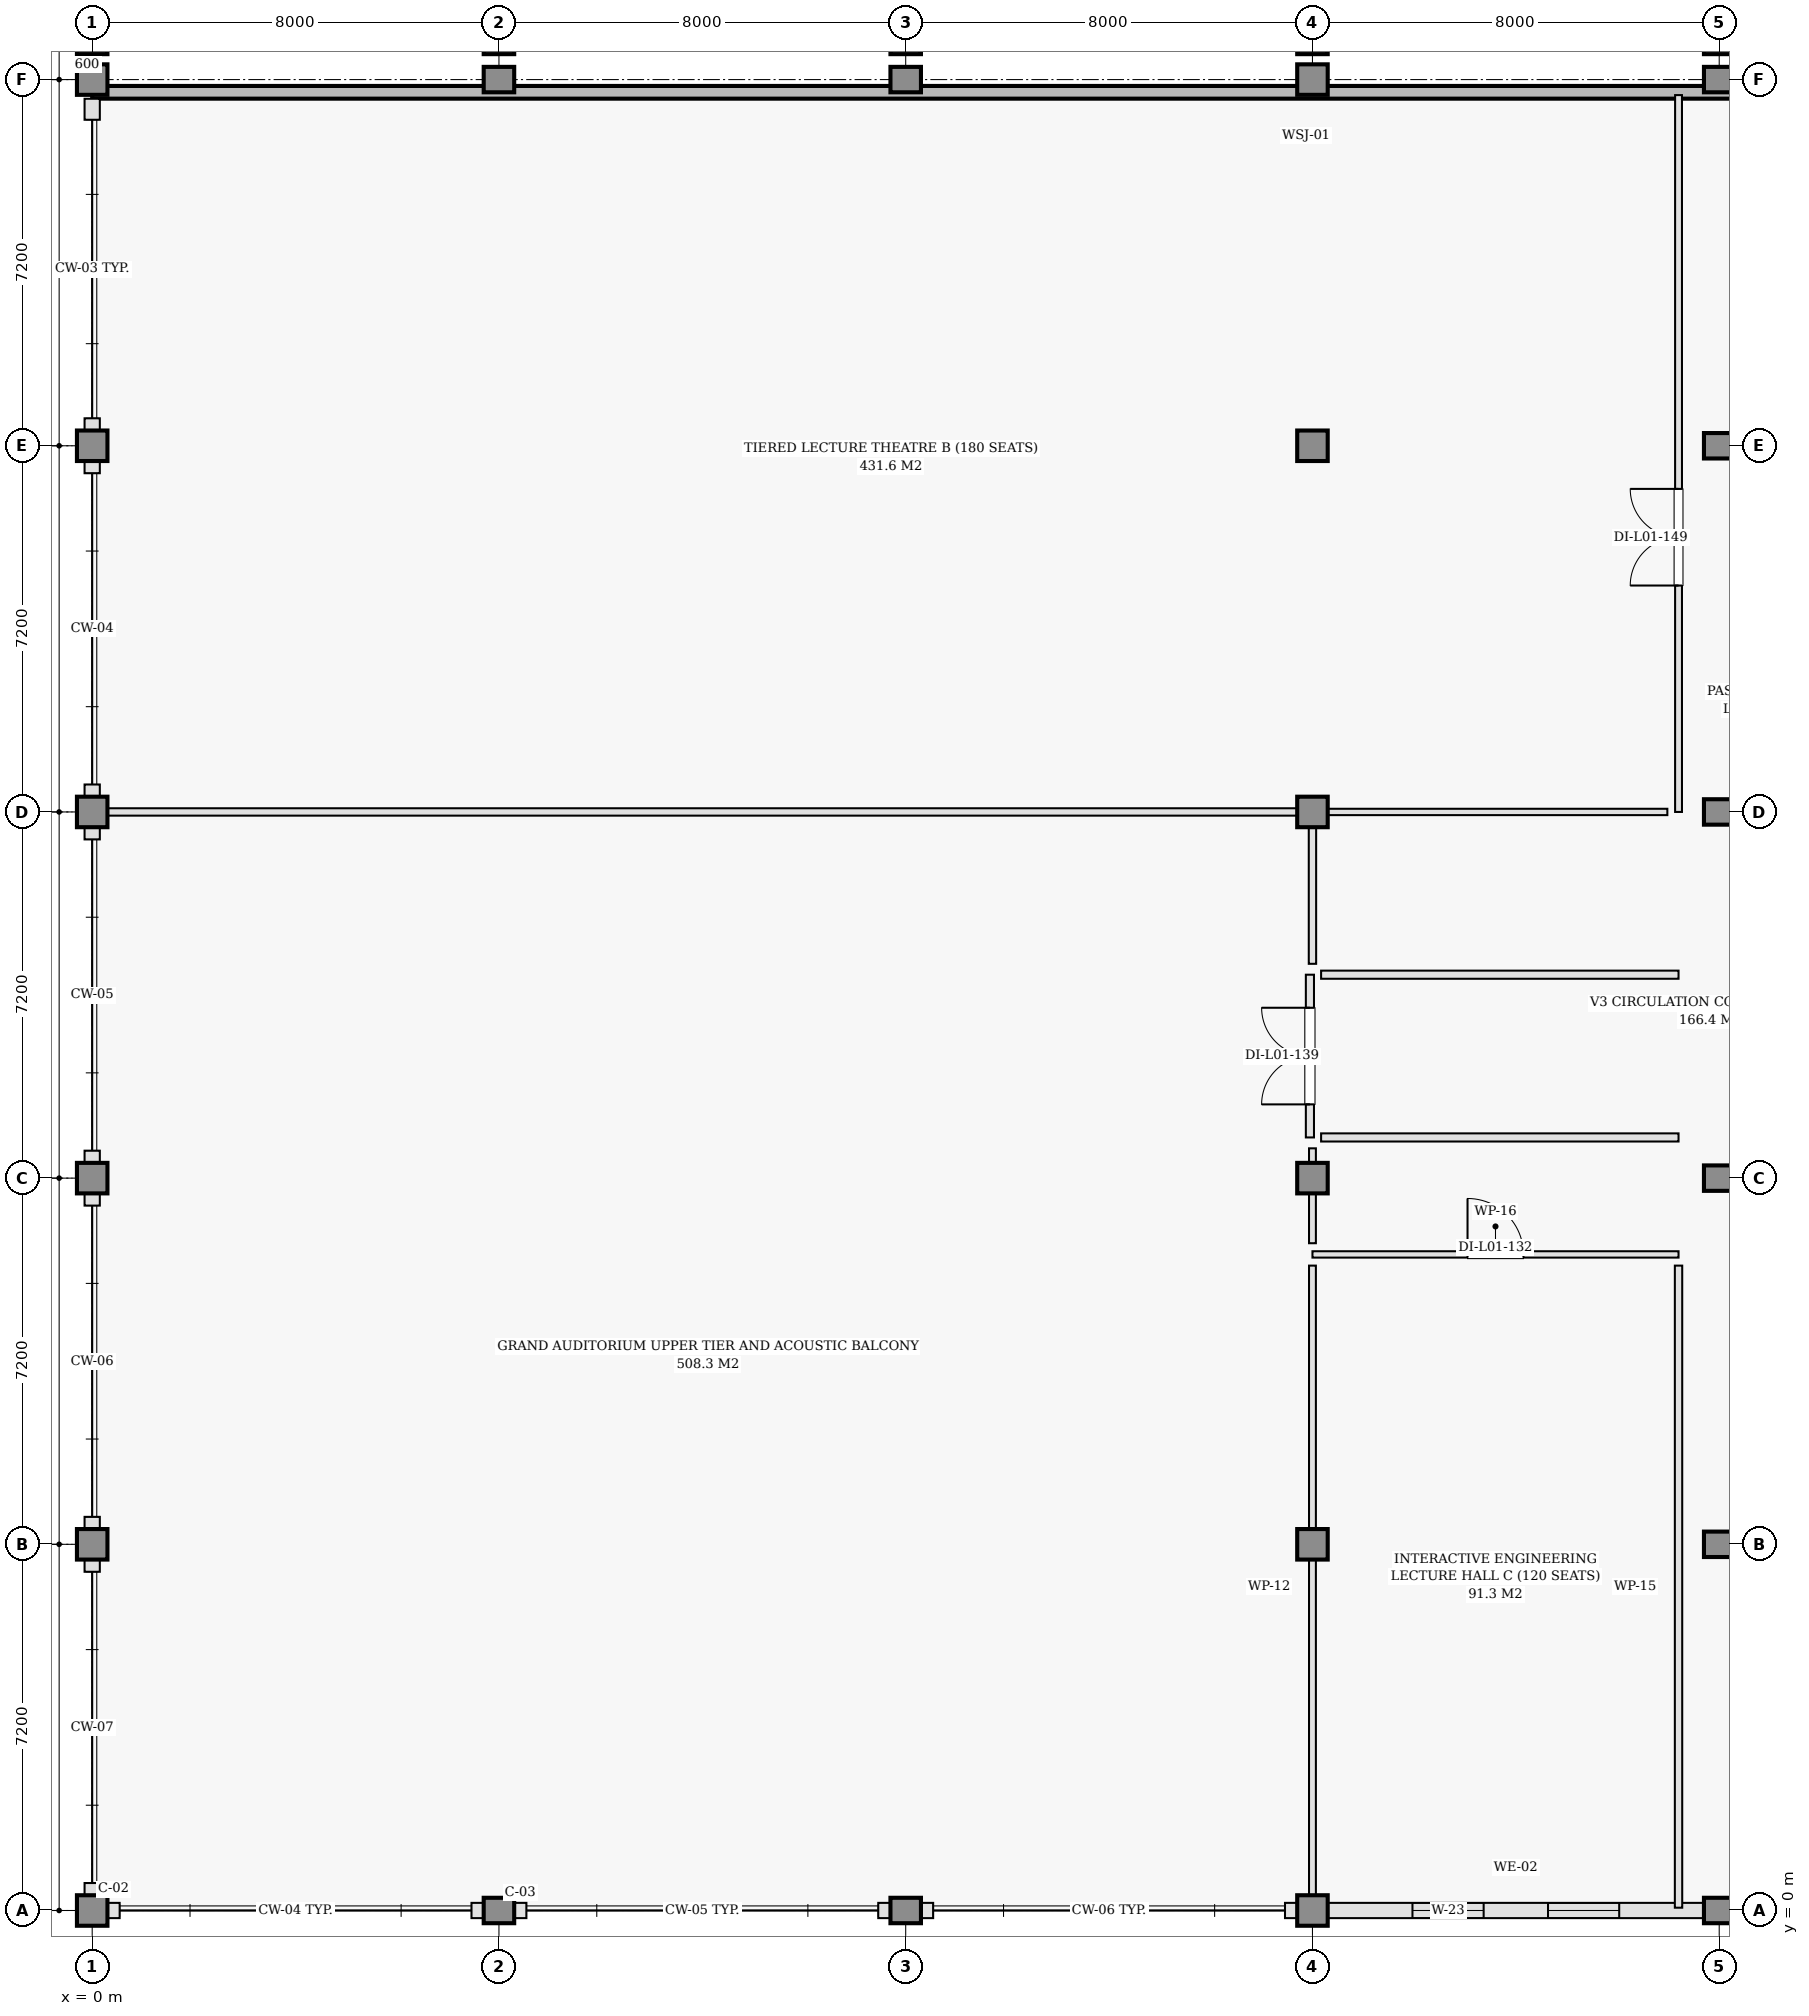
"""IFC4 building model, lengths in metres.
Left out: names, types, materials, properties, quantities, classifications, styles, units other than length and angle.
Written with IfcOpenShell. Run it as: python <this file> out.ifc"""

import sys

from ifc_helpers import new_model, si_unit, direction, frame, frame_2d, origin, origin_2d, place, context, subcontext, project, spatial, rectangle, extrude, element, fill, save


model = new_model("IFC4")
c1 = context("Model", 3, precision=1e-05, world=origin(), true_north=direction((0.0, 1.0)))
c2 = subcontext(c1, "Body", "Model", "MODEL_VIEW")
j1 = project(units=[si_unit("LENGTHUNIT", "METRE"), si_unit("PLANEANGLEUNIT", "RADIAN")], contexts=[c1])
p1 = place(None, origin())
s1 = spatial("IfcSite", under=j1, at=p1, CompositionType="ELEMENT")
p2 = place(p1, origin())
s2 = spatial("IfcBuilding", under=s1, at=p2, CompositionType="ELEMENT")
p3 = place(p2, frame((0.0, 0.0, 4.8)))
s3 = spatial("IfcBuildingStorey", under=s2, at=p3, CompositionType="ELEMENT", Elevation=4.8)
for number, where, z_axis, x_axis in (
    (1, (0.0, 0.0, 0.0), (0.0, 0.0, 1.0), (1.0, 0.0, 0.0)),
    (2, (0.0, 7.2, 0.0), (0.0, 0.0, 1.0), (1.0, 0.0, 0.0)),
    (3, (0.0, 14.4, 0.0), (0.0, 0.0, 1.0), (1.0, 0.0, 0.0)),
    (4, (0.0, 21.6, 0.0), (0.0, 0.0, 1.0), (1.0, 0.0, 0.0)),
    (5, (0.0, 28.8, 0.0), (0.0, 0.0, 1.0), (1.0, 0.0, 0.0)),
    (6, (0.0, 36.0, 0.0), (0.0, 0.0, 1.0), (1.0, 0.0, 0.0)),
):
    element("IfcColumn", number, at=place(p3, frame(where, z_axis=z_axis, x_axis=x_axis)), inside=s3, PredefinedType="COLUMN", context=c2, shape_type="SweptSolid", body=[
        extrude(rectangle(XDim=0.6, YDim=0.6, at=origin_2d()), origin(), (0.0, 0.0, 1.0), 4.8),
    ])
for number, where, z_axis, x_axis in (
    (7, (8.0, 0.0, 0.0), (0.0, 0.0, 1.0), (1.0, 0.0, 0.0)),
    (8, (8.0, 36.0, 0.0), (0.0, 0.0, 1.0), (1.0, 0.0, 0.0)),
    (9, (16.0, 0.0, 0.0), (0.0, 0.0, 1.0), (1.0, 0.0, 0.0)),
    (10, (16.0, 36.0, 0.0), (0.0, 0.0, 1.0), (1.0, 0.0, 0.0)),
):
    element("IfcColumn", number, at=place(p3, frame(where, z_axis=z_axis, x_axis=x_axis)), inside=s3, PredefinedType="COLUMN", context=c2, shape_type="SweptSolid", body=[
        extrude(rectangle(XDim=0.5, YDim=0.5, at=origin_2d()), origin(), (0.0, 0.0, 1.0), 4.8),
    ])
for number, where, z_axis, x_axis in (
    (11, (24.0, 0.0, 0.0), (0.0, 0.0, 1.0), (1.0, 0.0, 0.0)),
    (12, (24.0, 7.2, 0.0), (0.0, 0.0, 1.0), (1.0, 0.0, 0.0)),
    (13, (24.0, 14.4, 0.0), (0.0, 0.0, 1.0), (1.0, 0.0, 0.0)),
    (14, (24.0, 21.6, 0.0), (0.0, 0.0, 1.0), (1.0, 0.0, 0.0)),
    (15, (24.0, 28.8, 0.0), (0.0, 0.0, 1.0), (1.0, 0.0, 0.0)),
    (16, (24.0, 36.0, 0.0), (0.0, 0.0, 1.0), (1.0, 0.0, 0.0)),
):
    element("IfcColumn", number, at=place(p3, frame(where, z_axis=z_axis, x_axis=x_axis)), inside=s3, PredefinedType="COLUMN", context=c2, shape_type="SweptSolid", body=[
        extrude(rectangle(XDim=0.6, YDim=0.6, at=origin_2d()), origin(), (0.0, 0.0, 1.0), 4.8),
    ])
for number, where, z_axis, x_axis in (
    (17, (32.0, 0.0, 0.0), (0.0, 0.0, 1.0), (1.0, 0.0, 0.0)),
    (18, (32.0, 7.2, 0.0), (0.0, 0.0, 1.0), (1.0, 0.0, 0.0)),
    (19, (32.0, 14.4, 0.0), (0.0, 0.0, 1.0), (1.0, 0.0, 0.0)),
    (20, (32.0, 21.6, 0.0), (0.0, 0.0, 1.0), (1.0, 0.0, 0.0)),
    (21, (32.0, 28.8, 0.0), (0.0, 0.0, 1.0), (1.0, 0.0, 0.0)),
    (22, (32.0, 36.0, 0.0), (0.0, 0.0, 1.0), (1.0, 0.0, 0.0)),
    (23, (0.0, 36.75, 0.0), (0.0, 0.0, 1.0), (1.0, 0.0, 0.0)),
    (24, (8.0, 36.75, 0.0), (0.0, 0.0, 1.0), (1.0, 0.0, 0.0)),
    (25, (16.0, 36.75, 0.0), (0.0, 0.0, 1.0), (1.0, 0.0, 0.0)),
    (26, (24.0, 36.75, 0.0), (0.0, 0.0, 1.0), (1.0, 0.0, 0.0)),
    (27, (32.0, 36.75, 0.0), (0.0, 0.0, 1.0), (1.0, 0.0, 0.0)),
):
    element("IfcColumn", number, at=place(p3, frame(where, z_axis=z_axis, x_axis=x_axis)), inside=s3, PredefinedType="COLUMN", context=c2, shape_type="SweptSolid", body=[
        extrude(rectangle(XDim=0.5, YDim=0.5, at=origin_2d()), origin(), (0.0, 0.0, 1.0), 4.8),
    ])
for number, where, z_axis, x_axis in (
    (28, (0.0, 0.0, 0.0), (0.0, 0.0, 1.0), (1.0, 0.0, 0.0)),
    (29, (7.46, 0.0, 0.0), (0.0, 0.0, 1.0), (1.0, 0.0, 0.0)),
    (30, (8.0, 0.0, 0.0), (0.0, 0.0, 1.0), (1.0, 0.0, 0.0)),
    (31, (15.46, 0.0, 0.0), (0.0, 0.0, 1.0), (1.0, 0.0, 0.0)),
    (32, (16.0, 0.0, 0.0), (0.0, 0.0, 1.0), (1.0, 0.0, 0.0)),
    (33, (23.46, 0.0, 0.0), (0.0, 0.0, 1.0), (1.0, 0.0, 0.0)),
):
    element("IfcWall", number, at=place(p3, frame(where, z_axis=z_axis, x_axis=x_axis)), inside=s3, PredefinedType="SOLIDWALL", context=c2, shape_type="SweptSolid", body=[
        extrude(rectangle(XDim=0.54, YDim=0.3, at=frame_2d((0.27, 0.0))), origin(), (0.0, 0.0, 1.0), 3.865),
    ])
p4 = place(p3, frame((24.0, 0.0, 0.0), z_axis=(0.0, 0.0, 1.0), x_axis=(1.0, 0.0, 0.0)))
e34 = element("IfcWall", 34, at=p4, inside=s3, PredefinedType="SOLIDWALL", context=c2, shape_type="SweptSolid", body=[
    extrude(rectangle(XDim=8.0, YDim=0.3, at=frame_2d((4.0, 0.0))), origin(), (0.0, 0.0, 1.0), 3.865),
])
p5 = place(p4, frame((1.967, 0.0, 0.9)))
e35 = element("IfcOpeningElement", 35, at=p5, cuts=e34, PredefinedType="OPENING", context=c2, shape_type="SweptSolid", body=[
    extrude(rectangle(XDim=1.4, YDim=2.2, at=frame_2d((0.7, 1.1))), frame((0.0, 0.16, 0.0), z_axis=(0.0, -1.0, 0.0), x_axis=(1.0, 0.0, 0.0)), (0.0, 0.0, 1.0), 0.32),
])
p6 = place(p4, frame((4.633, 0.0, 0.9)))
e36 = element("IfcOpeningElement", 36, at=p6, cuts=e34, PredefinedType="OPENING", context=c2, shape_type="SweptSolid", body=[
    extrude(rectangle(XDim=1.4, YDim=2.2, at=frame_2d((0.7, 1.1))), frame((0.0, 0.16, 0.0), z_axis=(0.0, -1.0, 0.0), x_axis=(1.0, 0.0, 0.0)), (0.0, 0.0, 1.0), 0.32),
])
p7 = place(p3, frame((32.0, 0.0, 0.0), z_axis=(0.0, 0.0, 1.0), x_axis=(1.0, 0.0, 0.0)))
e37 = element("IfcWall", 37, at=p7, inside=s3, PredefinedType="SOLIDWALL", context=c2, shape_type="SweptSolid", body=[
    extrude(rectangle(XDim=8.0, YDim=0.3, at=frame_2d((4.0, 0.0))), origin(), (0.0, 0.0, 1.0), 3.865),
])
p8 = place(p7, frame((4.833, 0.0, 0.9)))
e38 = element("IfcOpeningElement", 38, at=p8, cuts=e37, PredefinedType="OPENING", context=c2, shape_type="SweptSolid", body=[
    extrude(rectangle(XDim=1.0, YDim=2.15, at=frame_2d((0.5, 1.075))), frame((0.0, 0.16, 0.0), z_axis=(0.0, -1.0, 0.0), x_axis=(1.0, 0.0, 0.0)), (0.0, 0.0, 1.0), 0.32),
])
p9 = place(p3, frame((47.75, 35.75, 0.0), z_axis=(0.0, 0.0, 1.0), x_axis=(-1.0, 0.0, 0.0)))
e39 = element("IfcWall", 39, at=p9, inside=s3, PredefinedType="SHEAR", context=c2, shape_type="SweptSolid", body=[
    extrude(rectangle(XDim=47.75, YDim=0.25, at=frame_2d((23.875, 0.0))), origin(), (0.0, 0.0, 1.0), 4.48),
])
p10 = place(p3, frame((0.0, 35.623, 0.0), z_axis=(0.0, 0.0, 1.0), x_axis=(0.0, -1.0, 0.0)))
e40 = element("IfcWall", 40, at=p10, inside=s3, PredefinedType="SOLIDWALL", context=c2, shape_type="SweptSolid", body=[
    extrude(rectangle(XDim=0.413, YDim=0.3, at=frame_2d((0.207, 0.0))), origin(), (0.0, 0.0, 1.0), 3.915),
])
for number, where, z_axis, x_axis in (
    (41, (0.0, 29.34, 0.0), (0.0, 0.0, 1.0), (0.0, -1.0, 0.0)),
    (42, (0.0, 28.8, 0.0), (0.0, 0.0, 1.0), (0.0, -1.0, 0.0)),
):
    element("IfcWall", number, at=place(p3, frame(where, z_axis=z_axis, x_axis=x_axis)), inside=s3, PredefinedType="SOLIDWALL", context=c2, shape_type="SweptSolid", body=[
        extrude(rectangle(XDim=0.54, YDim=0.3, at=frame_2d((0.27, 0.0))), origin(), (0.0, 0.0, 1.0), 3.065),
    ])
p11 = place(p3, frame((0.0, 22.14, 0.0), z_axis=(0.0, 0.0, 1.0), x_axis=(0.0, -1.0, 0.0)))
e43 = element("IfcWall", 43, at=p11, inside=s3, PredefinedType="SOLIDWALL", context=c2, shape_type="SweptSolid", body=[
    extrude(rectangle(XDim=0.54, YDim=0.3, at=frame_2d((0.27, 0.0))), origin(), (0.0, 0.0, 1.0), 3.065),
])
for number, where, z_axis, x_axis in (
    (44, (0.0, 21.6, 0.0), (0.0, 0.0, 1.0), (0.0, -1.0, 0.0)),
    (45, (0.0, 14.94, 0.0), (0.0, 0.0, 1.0), (0.0, -1.0, 0.0)),
):
    element("IfcWall", number, at=place(p3, frame(where, z_axis=z_axis, x_axis=x_axis)), inside=s3, PredefinedType="SOLIDWALL", context=c2, shape_type="SweptSolid", body=[
        extrude(rectangle(XDim=0.54, YDim=0.3, at=frame_2d((0.27, 0.0))), origin(), (0.0, 0.0, 1.0), 3.065),
    ])
p12 = place(p3, frame((0.0, 14.4, 0.0), z_axis=(0.0, 0.0, 1.0), x_axis=(0.0, -1.0, 0.0)))
e46 = element("IfcWall", 46, at=p12, inside=s3, PredefinedType="SOLIDWALL", context=c2, shape_type="SweptSolid", body=[
    extrude(rectangle(XDim=0.54, YDim=0.3, at=frame_2d((0.27, 0.0))), origin(), (0.0, 0.0, 1.0), 3.065),
])
for number, where, z_axis, x_axis in (
    (47, (0.0, 7.74, 0.0), (0.0, 0.0, 1.0), (0.0, -1.0, 0.0)),
    (48, (0.0, 7.2, 0.0), (0.0, 0.0, 1.0), (0.0, -1.0, 0.0)),
):
    element("IfcWall", number, at=place(p3, frame(where, z_axis=z_axis, x_axis=x_axis)), inside=s3, PredefinedType="SOLIDWALL", context=c2, shape_type="SweptSolid", body=[
        extrude(rectangle(XDim=0.54, YDim=0.3, at=frame_2d((0.27, 0.0))), origin(), (0.0, 0.0, 1.0), 3.065),
    ])
p13 = place(p3, frame((0.0, 0.54, 0.0), z_axis=(0.0, 0.0, 1.0), x_axis=(0.0, -1.0, 0.0)))
e49 = element("IfcWall", 49, at=p13, inside=s3, PredefinedType="SOLIDWALL", context=c2, shape_type="SweptSolid", body=[
    extrude(rectangle(XDim=0.388, YDim=0.3, at=frame_2d((0.194, 0.0))), origin(), (0.0, 0.0, 1.0), 3.865),
])
p14 = place(p3, frame((24.0, 12.9, 0.0), z_axis=(0.0, 0.0, 1.0), x_axis=(1.0, 0.0, 0.0)))
e50 = element("IfcWall", 50, at=p14, inside=s3, PredefinedType="PARTITIONING", context=c2, shape_type="SweptSolid", body=[
    extrude(rectangle(XDim=7.2, YDim=0.125, at=frame_2d((3.6, 0.0))), origin(), (0.0, 0.0, 1.0), 3.915),
])
p15 = place(p14, frame((3.05, 0.0, 0.0)))
e51 = element("IfcOpeningElement", 51, at=p15, cuts=e50, PredefinedType="OPENING", context=c2, shape_type="SweptSolid", body=[
    extrude(rectangle(XDim=1.1, YDim=2.15, at=frame_2d((0.55, 1.075))), frame((0.0, 0.073, 0.0), z_axis=(0.0, -1.0, 0.0), x_axis=(1.0, 0.0, 0.0)), (0.0, 0.0, 1.0), 0.145),
])
p16 = place(p3, frame((31.2, 0.055, 0.0), z_axis=(0.0, 0.0, 1.0), x_axis=(0.0, 1.0, 0.0)))
e52 = element("IfcWall", 52, at=p16, inside=s3, PredefinedType="PARTITIONING", context=c2, shape_type="SweptSolid", body=[
    extrude(rectangle(XDim=12.625, YDim=0.145, at=frame_2d((6.312, 0.0))), origin(), (0.0, 0.0, 1.0), 3.865),
])
p17 = place(p3, frame((24.0, 0.055, 0.0), z_axis=(0.0, 0.0, 1.0), x_axis=(0.0, 1.0, 0.0)))
e53 = element("IfcWall", 53, at=p17, inside=s3, PredefinedType="PARTITIONING", context=c2, shape_type="SweptSolid", body=[
    extrude(rectangle(XDim=12.625, YDim=0.135, at=frame_2d((6.312, 0.0))), origin(), (0.0, 0.0, 1.0), 3.915),
])
p18 = place(p3, frame((23.95, 15.2, 0.0), z_axis=(0.0, 0.0, 1.0), x_axis=(0.0, 1.0, 0.0)))
e54 = element("IfcWall", 54, at=p18, inside=s3, PredefinedType="PARTITIONING", context=c2, shape_type="SweptSolid", body=[
    extrude(rectangle(XDim=3.2, YDim=0.16, at=frame_2d((1.6, 0.0))), origin(), (0.0, 0.0, 1.0), 3.915),
])
p19 = place(p18, frame((0.65, 0.0, 0.0)))
e55 = element("IfcOpeningElement", 55, at=p19, cuts=e54, PredefinedType="OPENING", context=c2, shape_type="SweptSolid", body=[
    extrude(rectangle(XDim=1.9, YDim=2.25, at=frame_2d((0.95, 1.125))), frame((0.0, 0.09, 0.0), z_axis=(0.0, -1.0, 0.0), x_axis=(1.0, 0.0, 0.0)), (0.0, 0.0, 1.0), 0.18),
])
p20 = place(p3, frame((0.055, 21.6, 0.0), z_axis=(0.0, 0.0, 1.0), x_axis=(1.0, 0.0, 0.0)))
e56 = element("IfcWall", 56, at=p20, inside=s3, PredefinedType="PARTITIONING", context=c2, shape_type="SweptSolid", body=[
    extrude(rectangle(XDim=23.945, YDim=0.145, at=frame_2d((11.973, 0.0))), origin(), (0.0, 0.0, 1.0), 3.065),
])
p21 = place(p3, frame((31.2, 21.6, 0.0), z_axis=(0.0, 0.0, 1.0), x_axis=(0.0, 1.0, 0.0)))
e57 = element("IfcWall", 57, at=p21, inside=s3, PredefinedType="PARTITIONING", context=c2, shape_type="SweptSolid", body=[
    extrude(rectangle(XDim=14.095, YDim=0.135, at=frame_2d((7.047, 0.0))), origin(), (0.0, 0.0, 1.0), 3.865),
])
p22 = place(p21, frame((4.452, 0.0, 0.0)))
e58 = element("IfcOpeningElement", 58, at=p22, cuts=e57, PredefinedType="OPENING", context=c2, shape_type="SweptSolid", body=[
    extrude(rectangle(XDim=1.9, YDim=2.25, at=frame_2d((0.95, 1.125))), frame((0.0, 0.078, 0.0), z_axis=(0.0, -1.0, 0.0), x_axis=(1.0, 0.0, 0.0)), (0.0, 0.0, 1.0), 0.155),
])
p23 = place(p3, frame((24.22, 21.6, 0.0), z_axis=(0.0, 0.0, 1.0), x_axis=(1.0, 0.0, 0.0)))
e59 = element("IfcWall", 59, at=p23, inside=s3, PredefinedType="PARTITIONING", context=c2, shape_type="SweptSolid", body=[
    extrude(rectangle(XDim=6.76, YDim=0.125, at=frame_2d((3.38, 0.0))), origin(), (0.0, 0.0, 1.0), 3.865),
])
p24 = place(p3, frame((24.0, 18.614, 0.0), z_axis=(0.0, 0.0, 1.0), x_axis=(0.0, 1.0, 0.0)))
e60 = element("IfcWall", 60, at=p24, inside=s3, PredefinedType="PARTITIONING", context=c2, shape_type="SweptSolid", body=[
    extrude(rectangle(XDim=2.766, YDim=0.145, at=frame_2d((1.383, 0.0))), origin(), (0.0, 0.0, 1.0), 3.915),
])
p25 = place(p3, frame((24.0, 13.12, 0.0), z_axis=(0.0, 0.0, 1.0), x_axis=(0.0, 1.0, 0.0)))
e61 = element("IfcWall", 61, at=p25, inside=s3, PredefinedType="PARTITIONING", context=c2, shape_type="SweptSolid", body=[
    extrude(rectangle(XDim=1.866, YDim=0.135, at=frame_2d((0.933, 0.0))), origin(), (0.0, 0.0, 1.0), 3.915),
])
for number, where, z_axis, x_axis in (
    (62, (24.17, 15.2, 0.0), (0.0, 0.0, 1.0), (1.0, 0.0, 0.0)),
    (63, (24.17, 18.4, 0.0), (0.0, 0.0, 1.0), (1.0, 0.0, 0.0)),
):
    element("IfcWall", number, at=place(p3, frame(where, z_axis=z_axis, x_axis=x_axis)), inside=s3, PredefinedType="PARTITIONING", context=c2, shape_type="SweptSolid", body=[
        extrude(rectangle(XDim=7.03, YDim=0.16, at=frame_2d((3.515, 0.0))), origin(), (0.0, 0.0, 1.0), 4.48),
    ])
p26 = place(p5, origin())
e64 = element("IfcWindow", 64, at=p26, inside=s3, PartitioningType="DOUBLE_PANEL_VERTICAL", PredefinedType="WINDOW", context=c2, shape_type="SweptSolid", body=[
    extrude(rectangle(XDim=1.4, YDim=2.2, at=frame_2d((0.7, 1.1))), frame((0.0, 0.03, 0.0), z_axis=(0.0, -1.0, 0.0), x_axis=(1.0, 0.0, 0.0)), (0.0, 0.0, 1.0), 0.06),
])
fill(e35, e64)
p27 = place(p6, origin())
e65 = element("IfcWindow", 65, at=p27, inside=s3, PartitioningType="DOUBLE_PANEL_VERTICAL", PredefinedType="WINDOW", context=c2, shape_type="SweptSolid", body=[
    extrude(rectangle(XDim=1.4, YDim=2.2, at=frame_2d((0.7, 1.1))), frame((0.0, 0.03, 0.0), z_axis=(0.0, -1.0, 0.0), x_axis=(1.0, 0.0, 0.0)), (0.0, 0.0, 1.0), 0.06),
])
fill(e36, e65)
p28 = place(p15, origin())
e66 = element("IfcDoor", 66, at=p28, inside=s3, OperationType="SINGLE_SWING_LEFT", PredefinedType="DOOR", context=c2, shape_type="SweptSolid", body=[
    extrude(rectangle(XDim=1.1, YDim=2.15, at=frame_2d((0.55, 1.075))), frame((0.0, 0.025, 0.0), z_axis=(0.0, -1.0, 0.0), x_axis=(1.0, 0.0, 0.0)), (0.0, 0.0, 1.0), 0.05),
])
fill(e51, e66)
p29 = place(p19, origin())
e67 = element("IfcDoor", 67, at=p29, inside=s3, OperationType="DOUBLE_DOOR_SINGLE_SWING", PredefinedType="DOOR", context=c2, shape_type="SweptSolid", body=[
    extrude(rectangle(XDim=1.9, YDim=2.25, at=frame_2d((0.95, 1.125))), frame((0.0, 0.025, 0.0), z_axis=(0.0, -1.0, 0.0), x_axis=(1.0, 0.0, 0.0)), (0.0, 0.0, 1.0), 0.05),
])
fill(e55, e67)
p30 = place(p22, origin())
e68 = element("IfcDoor", 68, at=p30, inside=s3, OperationType="DOUBLE_DOOR_SINGLE_SWING", PredefinedType="DOOR", context=c2, shape_type="SweptSolid", body=[
    extrude(rectangle(XDim=1.9, YDim=2.25, at=frame_2d((0.95, 1.125))), frame((0.0, 0.025, 0.0), z_axis=(0.0, -1.0, 0.0), x_axis=(1.0, 0.0, 0.0)), (0.0, 0.0, 1.0), 0.05),
])
fill(e58, e68)
save(model, sys.argv[1])
